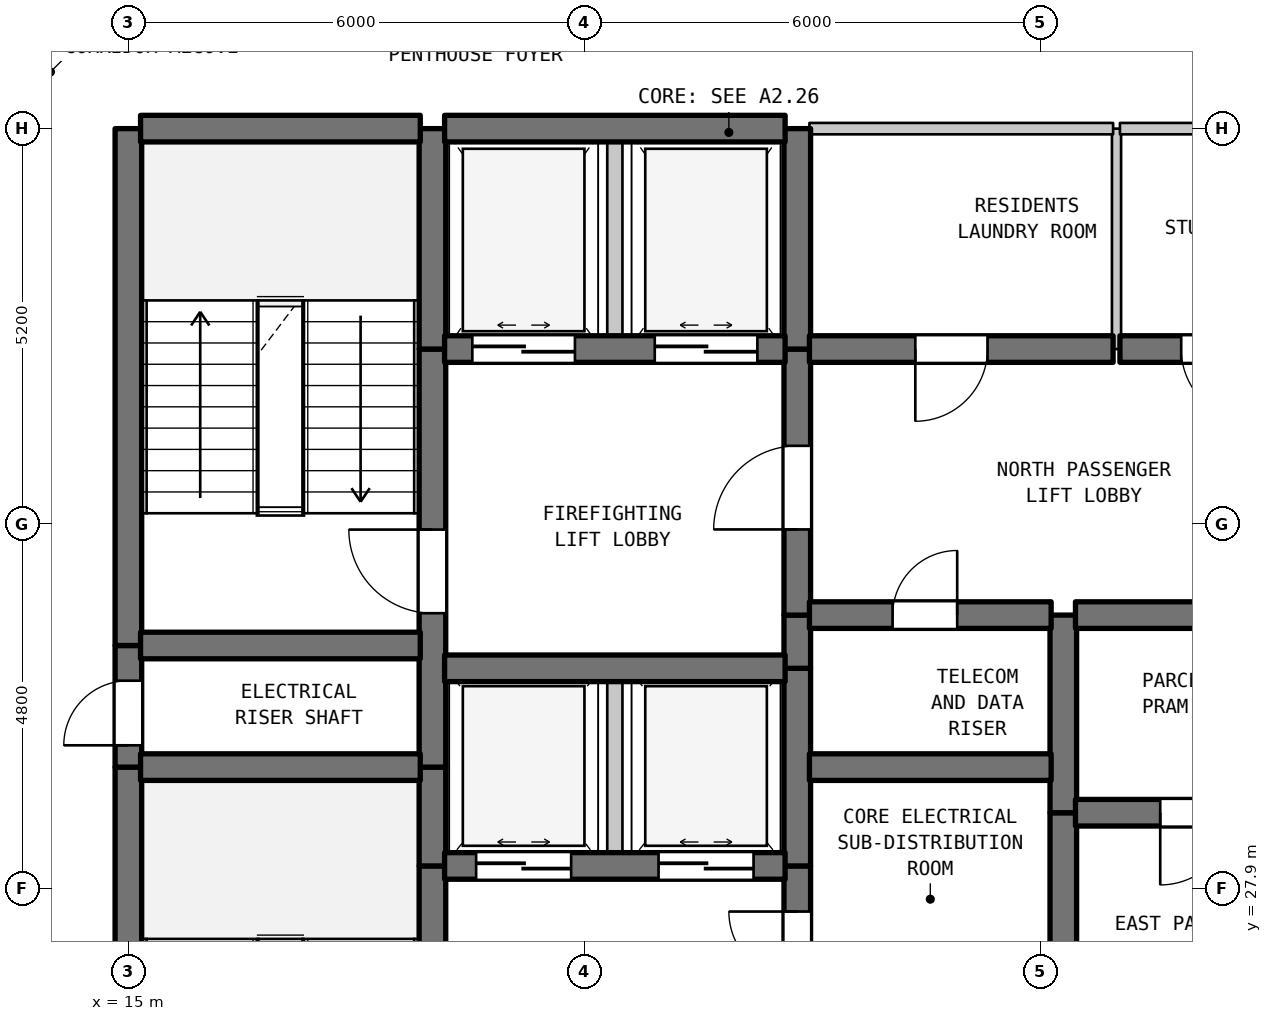
"""IFC4 building model, lengths in metres.
Left out: names, types, materials, properties, quantities, classifications, styles, units other than length and angle.
Written with IfcOpenShell. Run it as: python <this file> out.ifc"""

import sys

from ifc_helpers import new_model, si_unit, direction, frame, frame_2d, origin, place, context, subcontext, project, spatial, rectangle, extrude, element, fill, save


model = new_model("IFC4")
c1 = context("Model", 3, precision=1e-05, world=origin(), true_north=direction((0.0, 1.0)))
c2 = subcontext(c1, "Body", "Model", "MODEL_VIEW")
j1 = project(units=[si_unit("LENGTHUNIT", "METRE"), si_unit("PLANEANGLEUNIT", "RADIAN")], contexts=[c1])
p1 = place(None, origin())
s1 = spatial("IfcSite", under=j1, at=p1, CompositionType="ELEMENT")
p2 = place(p1, origin())
s2 = spatial("IfcBuilding", under=s1, at=p2, CompositionType="ELEMENT")
p3 = place(p2, frame((0.0, 0.0, 311.0)))
s3 = spatial("IfcBuildingStorey", under=s2, at=p3, CompositionType="ELEMENT", Elevation=311.0)
p4 = place(p3, frame((15.0, 22.7, 0.0), z_axis=(0.0, 0.0, 1.0), x_axis=(0.0, 1.0, 0.0)))
e1 = element("IfcWall", 1, at=p4, inside=s3, PredefinedType="SHEAR", context=c2, shape_type="SweptSolid", body=[
    extrude(rectangle(XDim=6.8, YDim=0.35, at=frame_2d((3.4, 0.0))), origin(), (0.0, 0.0, 1.0), 3.28),
])
p5 = place(p3, frame((15.0, 29.5, 0.0), z_axis=(0.0, 0.0, 1.0), x_axis=(0.0, 1.0, 0.0)))
e2 = element("IfcWall", 2, at=p5, inside=s3, PredefinedType="SHEAR", context=c2, shape_type="SweptSolid", body=[
    extrude(rectangle(XDim=1.6, YDim=0.35, at=frame_2d((0.8, 0.0))), origin(), (0.0, 0.0, 1.0), 3.28),
])
p6 = place(p5, frame((0.287, 0.0, 0.0)))
e3 = element("IfcOpeningElement", 3, at=p6, cuts=e2, PredefinedType="OPENING", context=c2, shape_type="SweptSolid", body=[
    extrude(rectangle(XDim=0.85, YDim=2.1, at=frame_2d((0.425, 1.05))), frame((0.0, 0.185, 0.0), z_axis=(0.0, -1.0, 0.0), x_axis=(1.0, 0.0, 0.0)), (0.0, 0.0, 1.0), 0.37),
])
p7 = place(p3, frame((15.0, 31.1, 0.0), z_axis=(0.0, 0.0, 1.0), x_axis=(0.0, 1.0, 0.0)))
e4 = element("IfcWall", 4, at=p7, inside=s3, PredefinedType="SHEAR", context=c2, shape_type="SweptSolid", body=[
    extrude(rectangle(XDim=6.8, YDim=0.35, at=frame_2d((3.4, 0.0))), origin(), (0.0, 0.0, 1.0), 3.28),
])
p8 = place(p3, frame((19.0, 22.7, 0.0), z_axis=(0.0, 0.0, 1.0), x_axis=(0.0, 1.0, 0.0)))
e5 = element("IfcWall", 5, at=p8, inside=s3, PredefinedType="SHEAR", context=c2, shape_type="SweptSolid", body=[
    extrude(rectangle(XDim=5.5, YDim=0.35, at=frame_2d((2.75, 0.0))), origin(), (0.0, 0.0, 1.0), 3.28),
])
p9 = place(p8, frame((0.631, 0.0, 0.0)))
e6 = element("IfcOpeningElement", 6, at=p9, cuts=e5, PredefinedType="OPENING", context=c2, shape_type="SweptSolid", body=[
    extrude(rectangle(XDim=1.1, YDim=2.15, at=frame_2d((0.55, 1.075))), frame((0.0, 0.185, 0.0), z_axis=(0.0, -1.0, 0.0), x_axis=(1.0, 0.0, 0.0)), (0.0, 0.0, 1.0), 0.37),
])
p10 = place(p3, frame((19.0, 28.2, 0.0), z_axis=(0.0, 0.0, 1.0), x_axis=(0.0, 1.0, 0.0)))
e7 = element("IfcWall", 7, at=p10, inside=s3, PredefinedType="SHEAR", context=c2, shape_type="SweptSolid", body=[
    extrude(rectangle(XDim=1.3, YDim=0.35, at=frame_2d((0.65, 0.0))), origin(), (0.0, 0.0, 1.0), 3.28),
])
p11 = place(p3, frame((19.0, 29.5, 0.0), z_axis=(0.0, 0.0, 1.0), x_axis=(0.0, 1.0, 0.0)))
e8 = element("IfcWall", 8, at=p11, inside=s3, PredefinedType="SHEAR", context=c2, shape_type="SweptSolid", body=[
    extrude(rectangle(XDim=5.5, YDim=0.35, at=frame_2d((2.75, 0.0))), origin(), (0.0, 0.0, 1.0), 3.28),
])
p12 = place(p11, frame((2.025, 0.0, 0.0)))
e9 = element("IfcOpeningElement", 9, at=p12, cuts=e8, PredefinedType="OPENING", context=c2, shape_type="SweptSolid", body=[
    extrude(rectangle(XDim=1.1, YDim=2.15, at=frame_2d((0.55, 1.075))), frame((0.0, 0.185, 0.0), z_axis=(0.0, -1.0, 0.0), x_axis=(1.0, 0.0, 0.0)), (0.0, 0.0, 1.0), 0.37),
])
p13 = place(p3, frame((19.0, 35.0, 0.0), z_axis=(0.0, 0.0, 1.0), x_axis=(0.0, 1.0, 0.0)))
e10 = element("IfcWall", 10, at=p13, inside=s3, PredefinedType="SHEAR", context=c2, shape_type="SweptSolid", body=[
    extrude(rectangle(XDim=2.9, YDim=0.35, at=frame_2d((1.45, 0.0))), origin(), (0.0, 0.0, 1.0), 3.28),
])
p14 = place(p3, frame((21.4, 28.2, 0.0), z_axis=(0.0, 0.0, 1.0), x_axis=(0.0, 1.0, 0.0)))
e11 = element("IfcWall", 11, at=p14, inside=s3, PredefinedType="STANDARD", context=c2, shape_type="SweptSolid", body=[
    extrude(rectangle(XDim=2.6, YDim=0.2, at=frame_2d((1.3, 0.0))), origin(), (0.0, 0.0, 1.0), 3.28),
])
p15 = place(p3, frame((21.4, 35.0, 0.0), z_axis=(0.0, 0.0, 1.0), x_axis=(0.0, 1.0, 0.0)))
e12 = element("IfcWall", 12, at=p15, inside=s3, PredefinedType="STANDARD", context=c2, shape_type="SweptSolid", body=[
    extrude(rectangle(XDim=2.9, YDim=0.2, at=frame_2d((1.45, 0.0))), origin(), (0.0, 0.0, 1.0), 3.28),
])
p16 = place(p3, frame((23.8, 26.1, 0.0), z_axis=(0.0, 0.0, 1.0), x_axis=(0.0, 1.0, 0.0)))
e13 = element("IfcWall", 13, at=p16, inside=s3, PredefinedType="SHEAR", context=c2, shape_type="SweptSolid", body=[
    extrude(rectangle(XDim=2.1, YDim=0.35, at=frame_2d((1.05, 0.0))), origin(), (0.0, 0.0, 1.0), 3.28),
])
p17 = place(p16, frame((0.6, 0.0, 0.0)))
e14 = element("IfcOpeningElement", 14, at=p17, cuts=e13, PredefinedType="OPENING", context=c2, shape_type="SweptSolid", body=[
    extrude(rectangle(XDim=0.9, YDim=2.15, at=frame_2d((0.45, 1.075))), frame((0.0, 0.185, 0.0), z_axis=(0.0, -1.0, 0.0), x_axis=(1.0, 0.0, 0.0)), (0.0, 0.0, 1.0), 0.37),
])
p18 = place(p3, frame((23.8, 28.2, 0.0), z_axis=(0.0, 0.0, 1.0), x_axis=(0.0, 1.0, 0.0)))
e15 = element("IfcWall", 15, at=p18, inside=s3, PredefinedType="SHEAR", context=c2, shape_type="SweptSolid", body=[
    extrude(rectangle(XDim=2.6, YDim=0.35, at=frame_2d((1.3, 0.0))), origin(), (0.0, 0.0, 1.0), 3.28),
])
p19 = place(p3, frame((23.8, 30.8, 0.0), z_axis=(0.0, 0.0, 1.0), x_axis=(0.0, 1.0, 0.0)))
e16 = element("IfcWall", 16, at=p19, inside=s3, PredefinedType="SHEAR", context=c2, shape_type="SweptSolid", body=[
    extrude(rectangle(XDim=0.7, YDim=0.35, at=frame_2d((0.35, 0.0))), origin(), (0.0, 0.0, 1.0), 3.28),
])
p20 = place(p3, frame((23.8, 31.5, 0.0), z_axis=(0.0, 0.0, 1.0), x_axis=(0.0, 1.0, 0.0)))
e17 = element("IfcWall", 17, at=p20, inside=s3, PredefinedType="SHEAR", context=c2, shape_type="SweptSolid", body=[
    extrude(rectangle(XDim=3.5, YDim=0.35, at=frame_2d((1.75, 0.0))), origin(), (0.0, 0.0, 1.0), 3.28),
])
p21 = place(p20, frame((1.127, 0.0, 0.0)))
e18 = element("IfcOpeningElement", 18, at=p21, cuts=e17, PredefinedType="OPENING", context=c2, shape_type="SweptSolid", body=[
    extrude(rectangle(XDim=1.1, YDim=2.15, at=frame_2d((0.55, 1.075))), frame((0.0, 0.185, 0.0), z_axis=(0.0, -1.0, 0.0), x_axis=(1.0, 0.0, 0.0)), (0.0, 0.0, 1.0), 0.37),
])
p22 = place(p3, frame((23.8, 35.0, 0.0), z_axis=(0.0, 0.0, 1.0), x_axis=(0.0, 1.0, 0.0)))
e19 = element("IfcWall", 19, at=p22, inside=s3, PredefinedType="SHEAR", context=c2, shape_type="SweptSolid", body=[
    extrude(rectangle(XDim=2.9, YDim=0.35, at=frame_2d((1.45, 0.0))), origin(), (0.0, 0.0, 1.0), 3.28),
])
p23 = place(p3, frame((27.3, 26.1, 0.0), z_axis=(0.0, 0.0, 1.0), x_axis=(0.0, 1.0, 0.0)))
e20 = element("IfcWall", 20, at=p23, inside=s3, PredefinedType="SHEAR", context=c2, shape_type="SweptSolid", body=[
    extrude(rectangle(XDim=2.8, YDim=0.35, at=frame_2d((1.4, 0.0))), origin(), (0.0, 0.0, 1.0), 3.28),
])
p24 = place(p3, frame((27.3, 28.9, 0.0), z_axis=(0.0, 0.0, 1.0), x_axis=(0.0, 1.0, 0.0)))
e21 = element("IfcWall", 21, at=p24, inside=s3, PredefinedType="SHEAR", context=c2, shape_type="SweptSolid", body=[
    extrude(rectangle(XDim=2.6, YDim=0.35, at=frame_2d((1.3, 0.0))), origin(), (0.0, 0.0, 1.0), 3.28),
])
p25 = place(p3, frame((28.0, 35.0, 0.0), z_axis=(0.0, 0.0, 1.0), x_axis=(0.0, 1.0, 0.0)))
e22 = element("IfcWall", 22, at=p25, inside=s3, PredefinedType="PARTITIONING", context=c2, shape_type="SweptSolid", body=[
    extrude(rectangle(XDim=2.9, YDim=0.12, at=frame_2d((1.45, 0.0))), origin(), (0.0, 0.0, 1.0), 3.28),
])
p26 = place(p3, frame((19.16, 28.2, 0.0), z_axis=(0.0, 0.0, 1.0), x_axis=(1.0, 0.0, 0.0)))
e23 = element("IfcWall", 23, at=p26, inside=s3, PredefinedType="SHEAR", context=c2, shape_type="SweptSolid", body=[
    extrude(rectangle(XDim=4.48, YDim=0.35, at=frame_2d((2.24, 0.0))), origin(), (0.0, 0.0, 1.0), 3.28),
])
p27 = place(p26, frame((0.415, 0.0, 0.0)))
e24 = element("IfcOpeningElement", 24, at=p27, cuts=e23, PredefinedType="OPENING", context=c2, shape_type="SweptSolid", body=[
    extrude(rectangle(XDim=1.25, YDim=2.2, at=frame_2d((0.625, 1.1))), frame((0.0, 0.185, 0.0), z_axis=(0.0, -1.0, 0.0), x_axis=(1.0, 0.0, 0.0)), (0.0, 0.0, 1.0), 0.37),
])
p28 = place(p26, frame((2.815, 0.0, 0.0)))
e25 = element("IfcOpeningElement", 25, at=p28, cuts=e23, PredefinedType="OPENING", context=c2, shape_type="SweptSolid", body=[
    extrude(rectangle(XDim=1.25, YDim=2.2, at=frame_2d((0.625, 1.1))), frame((0.0, 0.185, 0.0), z_axis=(0.0, -1.0, 0.0), x_axis=(1.0, 0.0, 0.0)), (0.0, 0.0, 1.0), 0.37),
])
p29 = place(p3, frame((27.46, 28.9, 0.0), z_axis=(0.0, 0.0, 1.0), x_axis=(1.0, 0.0, 0.0)))
e26 = element("IfcWall", 26, at=p29, inside=s3, PredefinedType="SHEAR", context=c2, shape_type="SweptSolid", body=[
    extrude(rectangle(XDim=3.18, YDim=0.35, at=frame_2d((1.59, 0.0))), origin(), (0.0, 0.0, 1.0), 3.28),
])
p30 = place(p29, frame((1.115, 0.0, 0.0)))
e27 = element("IfcOpeningElement", 27, at=p30, cuts=e26, PredefinedType="OPENING", context=c2, shape_type="SweptSolid", body=[
    extrude(rectangle(XDim=0.95, YDim=2.15, at=frame_2d((0.475, 1.075))), frame((0.0, 0.185, 0.0), z_axis=(0.0, -1.0, 0.0), x_axis=(1.0, 0.0, 0.0)), (0.0, 0.0, 1.0), 0.37),
])
p31 = place(p3, frame((15.16, 29.5, 0.0), z_axis=(0.0, 0.0, 1.0), x_axis=(1.0, 0.0, 0.0)))
e28 = element("IfcWall", 28, at=p31, inside=s3, PredefinedType="SHEAR", context=c2, shape_type="SweptSolid", body=[
    extrude(rectangle(XDim=3.68, YDim=0.35, at=frame_2d((1.84, 0.0))), origin(), (0.0, 0.0, 1.0), 3.28),
])
p32 = place(p3, frame((23.96, 29.5, 0.0), z_axis=(0.0, 0.0, 1.0), x_axis=(1.0, 0.0, 0.0)))
e29 = element("IfcWall", 29, at=p32, inside=s3, PredefinedType="SHEAR", context=c2, shape_type="SweptSolid", body=[
    extrude(rectangle(XDim=3.18, YDim=0.35, at=frame_2d((1.59, 0.0))), origin(), (0.0, 0.0, 1.0), 3.28),
])
p33 = place(p3, frame((19.16, 30.8, 0.0), z_axis=(0.0, 0.0, 1.0), x_axis=(1.0, 0.0, 0.0)))
e30 = element("IfcWall", 30, at=p33, inside=s3, PredefinedType="SHEAR", context=c2, shape_type="SweptSolid", body=[
    extrude(rectangle(XDim=4.48, YDim=0.35, at=frame_2d((2.24, 0.0))), origin(), (0.0, 0.0, 1.0), 3.28),
])
p34 = place(p3, frame((15.16, 31.1, 0.0), z_axis=(0.0, 0.0, 1.0), x_axis=(1.0, 0.0, 0.0)))
e31 = element("IfcWall", 31, at=p34, inside=s3, PredefinedType="SHEAR", context=c2, shape_type="SweptSolid", body=[
    extrude(rectangle(XDim=3.68, YDim=0.35, at=frame_2d((1.84, 0.0))), origin(), (0.0, 0.0, 1.0), 3.28),
])
p35 = place(p3, frame((23.96, 31.5, 0.0), z_axis=(0.0, 0.0, 1.0), x_axis=(1.0, 0.0, 0.0)))
e32 = element("IfcWall", 32, at=p35, inside=s3, PredefinedType="SHEAR", context=c2, shape_type="SweptSolid", body=[
    extrude(rectangle(XDim=3.18, YDim=0.35, at=frame_2d((1.59, 0.0))), origin(), (0.0, 0.0, 1.0), 3.28),
])
p36 = place(p35, frame((1.094, 0.0, 0.0)))
e33 = element("IfcOpeningElement", 33, at=p36, cuts=e32, PredefinedType="OPENING", context=c2, shape_type="SweptSolid", body=[
    extrude(rectangle(XDim=0.85, YDim=2.1, at=frame_2d((0.425, 1.05))), frame((0.0, 0.185, 0.0), z_axis=(0.0, -1.0, 0.0), x_axis=(1.0, 0.0, 0.0)), (0.0, 0.0, 1.0), 0.37),
])
p37 = place(p3, frame((27.46, 31.5, 0.0), z_axis=(0.0, 0.0, 1.0), x_axis=(1.0, 0.0, 0.0)))
e34 = element("IfcWall", 34, at=p37, inside=s3, PredefinedType="SHEAR", context=c2, shape_type="SweptSolid", body=[
    extrude(rectangle(XDim=3.18, YDim=0.35, at=frame_2d((1.59, 0.0))), origin(), (0.0, 0.0, 1.0), 3.28),
])
p38 = place(p3, frame((19.16, 35.0, 0.0), z_axis=(0.0, 0.0, 1.0), x_axis=(1.0, 0.0, 0.0)))
e35 = element("IfcWall", 35, at=p38, inside=s3, PredefinedType="SHEAR", context=c2, shape_type="SweptSolid", body=[
    extrude(rectangle(XDim=4.48, YDim=0.35, at=frame_2d((2.24, 0.0))), origin(), (0.0, 0.0, 1.0), 3.28),
])
p39 = place(p38, frame((0.365, 0.0, 0.0)))
e36 = element("IfcOpeningElement", 36, at=p39, cuts=e35, PredefinedType="OPENING", context=c2, shape_type="SweptSolid", body=[
    extrude(rectangle(XDim=1.35, YDim=2.2, at=frame_2d((0.675, 1.1))), frame((0.0, 0.185, 0.0), z_axis=(0.0, -1.0, 0.0), x_axis=(1.0, 0.0, 0.0)), (0.0, 0.0, 1.0), 0.37),
])
p40 = place(p38, frame((2.765, 0.0, 0.0)))
e37 = element("IfcOpeningElement", 37, at=p40, cuts=e35, PredefinedType="OPENING", context=c2, shape_type="SweptSolid", body=[
    extrude(rectangle(XDim=1.35, YDim=2.2, at=frame_2d((0.675, 1.1))), frame((0.0, 0.185, 0.0), z_axis=(0.0, -1.0, 0.0), x_axis=(1.0, 0.0, 0.0)), (0.0, 0.0, 1.0), 0.37),
])
p41 = place(p3, frame((23.96, 35.0, 0.0), z_axis=(0.0, 0.0, 1.0), x_axis=(1.0, 0.0, 0.0)))
e38 = element("IfcWall", 38, at=p41, inside=s3, PredefinedType="SHEAR", context=c2, shape_type="SweptSolid", body=[
    extrude(rectangle(XDim=3.995, YDim=0.35, at=frame_2d((1.998, 0.0))), origin(), (0.0, 0.0, 1.0), 3.28),
])
p42 = place(p41, frame((1.393, 0.0, 0.0)))
e39 = element("IfcOpeningElement", 39, at=p42, cuts=e38, PredefinedType="OPENING", context=c2, shape_type="SweptSolid", body=[
    extrude(rectangle(XDim=0.95, YDim=2.15, at=frame_2d((0.475, 1.075))), frame((0.0, 0.185, 0.0), z_axis=(0.0, -1.0, 0.0), x_axis=(1.0, 0.0, 0.0)), (0.0, 0.0, 1.0), 0.37),
])
p43 = place(p3, frame((28.045, 35.0, 0.0), z_axis=(0.0, 0.0, 1.0), x_axis=(1.0, 0.0, 0.0)))
e40 = element("IfcWall", 40, at=p43, inside=s3, PredefinedType="SHEAR", context=c2, shape_type="SweptSolid", body=[
    extrude(rectangle(XDim=2.595, YDim=0.35, at=frame_2d((1.297, 0.0))), origin(), (0.0, 0.0, 1.0), 3.28),
])
p44 = place(p43, frame((0.806, 0.0, 0.0)))
e41 = element("IfcOpeningElement", 41, at=p44, cuts=e40, PredefinedType="OPENING", context=c2, shape_type="SweptSolid", body=[
    extrude(rectangle(XDim=0.95, YDim=2.15, at=frame_2d((0.475, 1.075))), frame((0.0, 0.185, 0.0), z_axis=(0.0, -1.0, 0.0), x_axis=(1.0, 0.0, 0.0)), (0.0, 0.0, 1.0), 0.37),
])
p45 = place(p3, frame((15.16, 37.9, 0.0), z_axis=(0.0, 0.0, 1.0), x_axis=(1.0, 0.0, 0.0)))
e42 = element("IfcWall", 42, at=p45, inside=s3, PredefinedType="SHEAR", context=c2, shape_type="SweptSolid", body=[
    extrude(rectangle(XDim=3.68, YDim=0.35, at=frame_2d((1.84, 0.0))), origin(), (0.0, 0.0, 1.0), 3.28),
])
p46 = place(p3, frame((19.16, 37.9, 0.0), z_axis=(0.0, 0.0, 1.0), x_axis=(1.0, 0.0, 0.0)))
e43 = element("IfcWall", 43, at=p46, inside=s3, PredefinedType="SHEAR", context=c2, shape_type="SweptSolid", body=[
    extrude(rectangle(XDim=4.48, YDim=0.35, at=frame_2d((2.24, 0.0))), origin(), (0.0, 0.0, 1.0), 3.28),
])
p47 = place(p3, frame((23.96, 37.9, 0.0), z_axis=(0.0, 0.0, 1.0), x_axis=(1.0, 0.0, 0.0)))
e44 = element("IfcWall", 44, at=p47, inside=s3, PredefinedType="STANDARD", context=c2, shape_type="SweptSolid", body=[
    extrude(rectangle(XDim=3.995, YDim=0.15, at=frame_2d((1.998, 0.0))), origin(), (0.0, 0.0, 1.0), 2.78),
])
p48 = place(p3, frame((28.045, 37.9, 0.0), z_axis=(0.0, 0.0, 1.0), x_axis=(1.0, 0.0, 0.0)))
e45 = element("IfcWall", 45, at=p48, inside=s3, PredefinedType="STANDARD", context=c2, shape_type="SweptSolid", body=[
    extrude(rectangle(XDim=2.695, YDim=0.15, at=frame_2d((1.348, 0.0))), origin(), (0.0, 0.0, 1.0), 2.78),
])
p49 = place(p6, origin())
e46 = element("IfcDoor", 46, at=p49, inside=s3, OperationType="SINGLE_SWING_LEFT", PredefinedType="DOOR", context=c2, shape_type="SweptSolid", body=[
    extrude(rectangle(XDim=0.85, YDim=2.1, at=frame_2d((0.425, 1.05))), frame((0.0, 0.025, 0.0), z_axis=(0.0, -1.0, 0.0), x_axis=(1.0, 0.0, 0.0)), (0.0, 0.0, 1.0), 0.05),
])
fill(e3, e46)
p50 = place(p12, origin())
e47 = element("IfcDoor", 47, at=p50, inside=s3, OperationType="SINGLE_SWING_RIGHT", PredefinedType="DOOR", context=c2, shape_type="SweptSolid", body=[
    extrude(rectangle(XDim=1.1, YDim=2.15, at=frame_2d((0.55, 1.075))), frame((0.0, 0.025, 0.0), z_axis=(0.0, -1.0, 0.0), x_axis=(1.0, 0.0, 0.0)), (0.0, 0.0, 1.0), 0.05),
])
fill(e9, e47)
p51 = place(p17, origin())
e48 = element("IfcDoor", 48, at=p51, inside=s3, OperationType="SINGLE_SWING_RIGHT", PredefinedType="DOOR", context=c2, shape_type="SweptSolid", body=[
    extrude(rectangle(XDim=0.9, YDim=2.15, at=frame_2d((0.45, 1.075))), frame((0.0, 0.025, 0.0), z_axis=(0.0, -1.0, 0.0), x_axis=(1.0, 0.0, 0.0)), (0.0, 0.0, 1.0), 0.05),
])
fill(e14, e48)
p52 = place(p21, origin())
e49 = element("IfcDoor", 49, at=p52, inside=s3, OperationType="SINGLE_SWING_LEFT", PredefinedType="DOOR", context=c2, shape_type="SweptSolid", body=[
    extrude(rectangle(XDim=1.1, YDim=2.15, at=frame_2d((0.55, 1.075))), frame((0.0, 0.025, 0.0), z_axis=(0.0, -1.0, 0.0), x_axis=(1.0, 0.0, 0.0)), (0.0, 0.0, 1.0), 0.05),
])
fill(e18, e49)
p53 = place(p27, origin())
e50 = element("IfcDoor", 50, at=p53, inside=s3, OperationType="DOUBLE_DOOR_SLIDING", PredefinedType="DOOR", context=c2, shape_type="SweptSolid", body=[
    extrude(rectangle(XDim=1.25, YDim=2.2, at=frame_2d((0.625, 1.1))), frame((0.0, 0.025, 0.0), z_axis=(0.0, -1.0, 0.0), x_axis=(1.0, 0.0, 0.0)), (0.0, 0.0, 1.0), 0.05),
])
fill(e24, e50)
p54 = place(p28, origin())
e51 = element("IfcDoor", 51, at=p54, inside=s3, OperationType="DOUBLE_DOOR_SLIDING", PredefinedType="DOOR", context=c2, shape_type="SweptSolid", body=[
    extrude(rectangle(XDim=1.25, YDim=2.2, at=frame_2d((0.625, 1.1))), frame((0.0, 0.025, 0.0), z_axis=(0.0, -1.0, 0.0), x_axis=(1.0, 0.0, 0.0)), (0.0, 0.0, 1.0), 0.05),
])
fill(e25, e51)
p55 = place(p30, frame((0.95, 0.0, 0.0), z_axis=(0.0, 0.0, 1.0), x_axis=(-1.0, 0.0, 0.0)))
e52 = element("IfcDoor", 52, at=p55, inside=s3, OperationType="SINGLE_SWING_LEFT", PredefinedType="DOOR", context=c2, shape_type="SweptSolid", body=[
    extrude(rectangle(XDim=0.95, YDim=2.15, at=frame_2d((0.475, 1.075))), frame((0.0, 0.025, 0.0), z_axis=(0.0, -1.0, 0.0), x_axis=(1.0, 0.0, 0.0)), (0.0, 0.0, 1.0), 0.05),
])
fill(e27, e52)
p56 = place(p36, origin())
e53 = element("IfcDoor", 53, at=p56, inside=s3, OperationType="SINGLE_SWING_RIGHT", PredefinedType="DOOR", context=c2, shape_type="SweptSolid", body=[
    extrude(rectangle(XDim=0.85, YDim=2.1, at=frame_2d((0.425, 1.05))), frame((0.0, 0.025, 0.0), z_axis=(0.0, -1.0, 0.0), x_axis=(1.0, 0.0, 0.0)), (0.0, 0.0, 1.0), 0.05),
])
fill(e33, e53)
p57 = place(p39, origin())
e54 = element("IfcDoor", 54, at=p57, inside=s3, OperationType="DOUBLE_DOOR_SLIDING", PredefinedType="DOOR", context=c2, shape_type="SweptSolid", body=[
    extrude(rectangle(XDim=1.35, YDim=2.2, at=frame_2d((0.675, 1.1))), frame((0.0, 0.025, 0.0), z_axis=(0.0, -1.0, 0.0), x_axis=(1.0, 0.0, 0.0)), (0.0, 0.0, 1.0), 0.05),
])
fill(e36, e54)
p58 = place(p40, origin())
e55 = element("IfcDoor", 55, at=p58, inside=s3, OperationType="DOUBLE_DOOR_SLIDING", PredefinedType="DOOR", context=c2, shape_type="SweptSolid", body=[
    extrude(rectangle(XDim=1.35, YDim=2.2, at=frame_2d((0.675, 1.1))), frame((0.0, 0.025, 0.0), z_axis=(0.0, -1.0, 0.0), x_axis=(1.0, 0.0, 0.0)), (0.0, 0.0, 1.0), 0.05),
])
fill(e37, e55)
p59 = place(p42, frame((0.95, 0.0, 0.0), z_axis=(0.0, 0.0, 1.0), x_axis=(-1.0, 0.0, 0.0)))
e56 = element("IfcDoor", 56, at=p59, inside=s3, OperationType="SINGLE_SWING_LEFT", PredefinedType="DOOR", context=c2, shape_type="SweptSolid", body=[
    extrude(rectangle(XDim=0.95, YDim=2.15, at=frame_2d((0.475, 1.075))), frame((0.0, 0.025, 0.0), z_axis=(0.0, -1.0, 0.0), x_axis=(1.0, 0.0, 0.0)), (0.0, 0.0, 1.0), 0.05),
])
fill(e39, e56)
p60 = place(p44, frame((0.95, 0.0, 0.0), z_axis=(0.0, 0.0, 1.0), x_axis=(-1.0, 0.0, 0.0)))
e57 = element("IfcDoor", 57, at=p60, inside=s3, OperationType="SINGLE_SWING_RIGHT", PredefinedType="DOOR", context=c2, shape_type="SweptSolid", body=[
    extrude(rectangle(XDim=0.95, YDim=2.15, at=frame_2d((0.475, 1.075))), frame((0.0, 0.025, 0.0), z_axis=(0.0, -1.0, 0.0), x_axis=(1.0, 0.0, 0.0)), (0.0, 0.0, 1.0), 0.05),
])
fill(e41, e57)
save(model, sys.argv[1])
